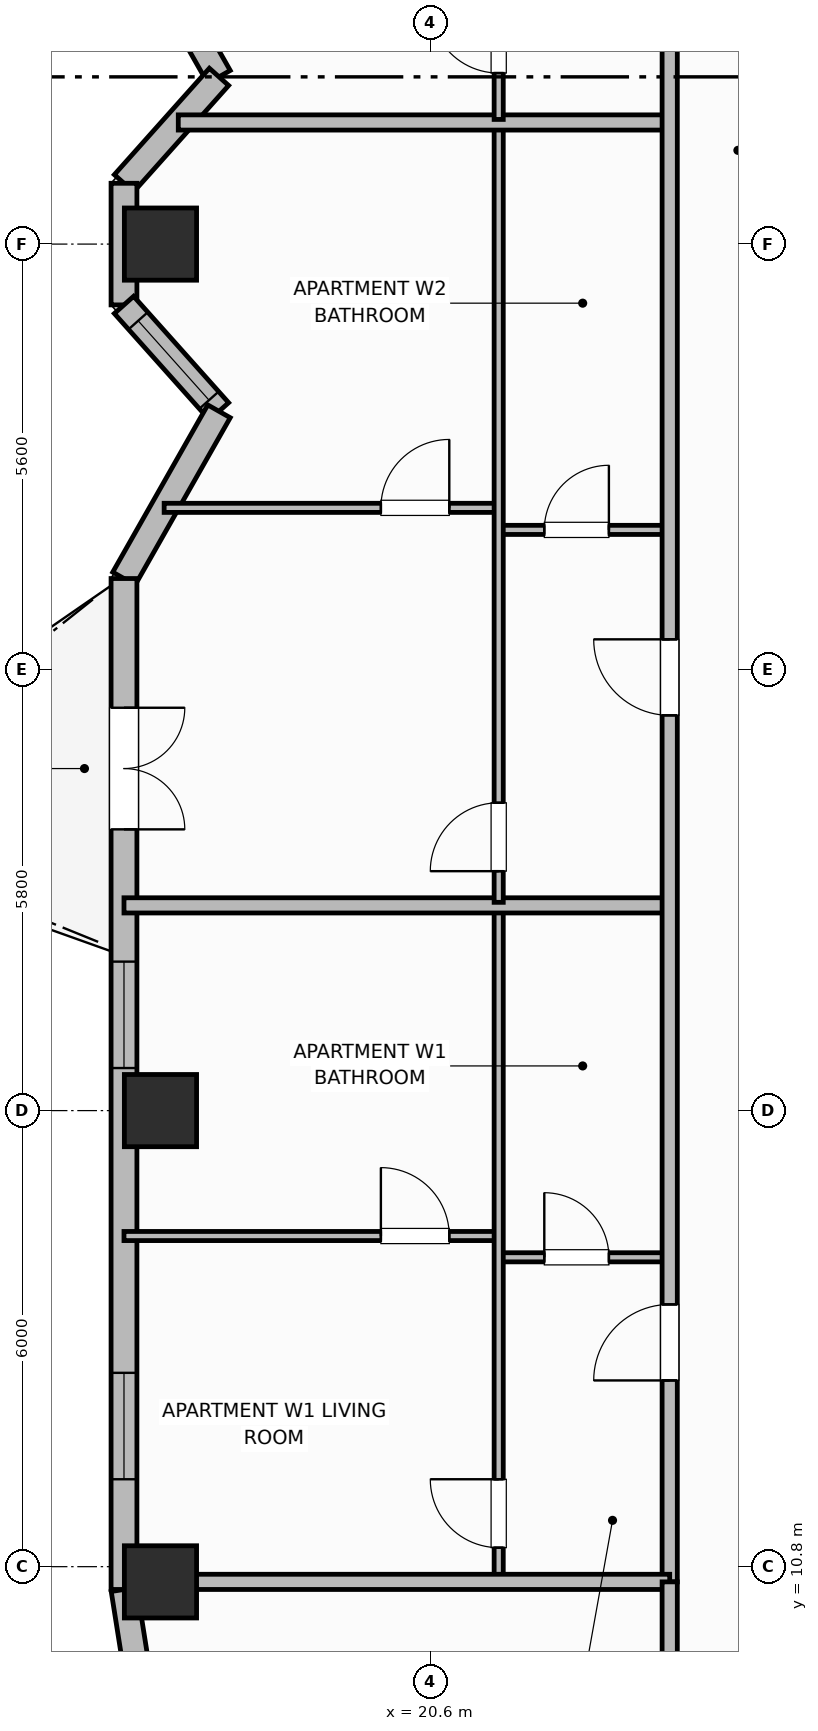
"""IFC4 building model, lengths in metres.
Left out: names, types, materials, properties, quantities, classifications, styles, units other than length and angle.
Written with IfcOpenShell. Run it as: python <this file> out.ifc"""

import sys

from ifc_helpers import new_model, si_unit, direction, frame, frame_2d, origin, origin_2d, place, context, subcontext, project, spatial, rectangle, extrude, element, fill, save


model = new_model("IFC4")
c1 = context("Model", 3, precision=1e-05, world=origin(), true_north=direction((0.0, 1.0)))
c2 = subcontext(c1, "Body", "Model", "MODEL_VIEW")
j1 = project(units=[si_unit("LENGTHUNIT", "METRE"), si_unit("PLANEANGLEUNIT", "RADIAN")], contexts=[c1])
p1 = place(None, origin())
s1 = spatial("IfcSite", under=j1, at=p1, CompositionType="ELEMENT")
p2 = place(p1, origin())
s2 = spatial("IfcBuilding", under=s1, at=p2, CompositionType="ELEMENT")
p3 = place(p2, frame((0.0, 0.0, 170.0)))
s3 = spatial("IfcBuildingStorey", under=s2, at=p3, CompositionType="ELEMENT", Elevation=170.0)
for number, where, z_axis, x_axis in (
    (1, (17.05, 10.6, 0.0), (0.0, 0.0, 1.0), (1.0, 0.0, 0.0)),
    (2, (17.05, 16.8, 0.0), (0.0, 0.0, 1.0), (1.0, 0.0, 0.0)),
    (3, (17.05, 28.2, 0.0), (0.0, 0.0, 1.0), (1.0, 0.0, 0.0)),
):
    element("IfcColumn", number, at=place(p3, frame(where, z_axis=z_axis, x_axis=x_axis)), inside=s3, PredefinedType="COLUMN", context=c2, shape_type="SweptSolid", body=[
        extrude(rectangle(XDim=0.95, YDim=0.95, at=origin_2d()), origin(), (0.0, 0.0, 1.0), 3.7),
    ])
p4 = place(p3, frame((16.57, 10.5, 0.0), z_axis=(0.0, 0.0, 1.0), x_axis=(0.156514556949, -0.987675651954, 0.0)))
e4 = element("IfcWall", 4, at=p4, inside=s3, PredefinedType="SOLIDWALL", context=c2, shape_type="SweptSolid", body=[
    extrude(rectangle(XDim=1.135, YDim=0.34, at=frame_2d((0.568, 0.0))), origin(), (0.0, 0.0, 1.0), 2.72),
])
p5 = place(p3, frame((16.57, 32.6, 0.0), z_axis=(0.0, 0.0, 1.0), x_axis=(0.493976255291, -0.869475393101, 0.0)))
e5 = element("IfcWall", 5, at=p5, inside=s3, PredefinedType="SOLIDWALL", context=c2, shape_type="SweptSolid", body=[
    extrude(rectangle(XDim=2.531, YDim=0.34, at=frame_2d((1.265, 0.0))), origin(), (0.0, 0.0, 1.0), 2.72),
])
p6 = place(p5, frame((0.715, 0.0, 0.91)))
e6 = element("IfcOpeningElement", 6, at=p6, cuts=e5, PredefinedType="OPENING", context=c2, shape_type="SweptSolid", body=[
    extrude(rectangle(XDim=1.1, YDim=1.65, at=frame_2d((0.55, 0.825))), frame((0.0, 0.18, 0.0), z_axis=(0.0, -1.0, 0.0), x_axis=(1.0, 0.0, 0.0)), (0.0, 0.0, 1.0), 0.36),
])
p7 = place(p3, frame((17.82, 30.4, 0.0), z_axis=(0.0, 0.0, 1.0), x_axis=(-0.666041619974, -0.74591457987, 0.0)))
e7 = element("IfcWall", 7, at=p7, inside=s3, PredefinedType="SOLIDWALL", context=c2, shape_type="SweptSolid", body=[
    extrude(rectangle(XDim=1.877, YDim=0.34, at=frame_2d((0.938, 0.0))), origin(), (0.0, 0.0, 1.0), 2.72),
])
p8 = place(p3, frame((16.57, 29.0, 0.0), z_axis=(0.0, 0.0, 1.0), x_axis=(0.0, -1.0, 0.0)))
e8 = element("IfcWall", 8, at=p8, inside=s3, PredefinedType="SOLIDWALL", context=c2, shape_type="SweptSolid", body=[
    extrude(rectangle(XDim=1.6, YDim=0.34, at=frame_2d((0.8, 0.0))), origin(), (0.0, 0.0, 1.0), 2.72),
])
p9 = place(p3, frame((16.57, 27.4, 0.0), z_axis=(0.0, 0.0, 1.0), x_axis=(0.666041619974, -0.74591457987, 0.0)))
e9 = element("IfcWall", 9, at=p9, inside=s3, PredefinedType="SOLIDWALL", context=c2, shape_type="SweptSolid", body=[
    extrude(rectangle(XDim=1.877, YDim=0.34, at=frame_2d((0.938, 0.0))), origin(), (0.0, 0.0, 1.0), 2.72),
])
p10 = place(p9, frame((0.28, 0.0, 0.71)))
e10 = element("IfcOpeningElement", 10, at=p10, cuts=e9, PredefinedType="OPENING", context=c2, shape_type="SweptSolid", body=[
    extrude(rectangle(XDim=1.4, YDim=1.85, at=frame_2d((0.7, 0.925))), frame((0.0, 0.18, 0.0), z_axis=(0.0, -1.0, 0.0), x_axis=(1.0, 0.0, 0.0)), (0.0, 0.0, 1.0), 0.36),
])
p11 = place(p3, frame((17.82, 26.0, 0.0), z_axis=(0.0, 0.0, 1.0), x_axis=(-0.494017696272, -0.869451847873, 0.0)))
e11 = element("IfcWall", 11, at=p11, inside=s3, PredefinedType="SOLIDWALL", context=c2, shape_type="SweptSolid", body=[
    extrude(rectangle(XDim=2.53, YDim=0.34, at=frame_2d((1.265, 0.0))), origin(), (0.0, 0.0, 1.0), 2.72),
])
p12 = place(p3, frame((16.57, 23.8, 0.0), z_axis=(0.0, 0.0, 1.0), x_axis=(0.0, -1.0, 0.0)))
e12 = element("IfcWall", 12, at=p12, inside=s3, PredefinedType="SOLIDWALL", context=c2, shape_type="SweptSolid", body=[
    extrude(rectangle(XDim=13.3, YDim=0.34, at=frame_2d((6.65, 0.0))), origin(), (0.0, 0.0, 1.0), 2.72),
])
p13 = place(p12, frame((1.7, 0.0, 0.0)))
e13 = element("IfcOpeningElement", 13, at=p13, cuts=e12, PredefinedType="OPENING", context=c2, shape_type="SweptSolid", body=[
    extrude(rectangle(XDim=1.6, YDim=2.1, at=frame_2d((0.8, 1.05))), frame((0.0, 0.18, 0.0), z_axis=(0.0, -1.0, 0.0), x_axis=(1.0, 0.0, 0.0)), (0.0, 0.0, 1.0), 0.36),
])
p14 = place(p12, frame((5.04, 0.0, 0.71)))
e14 = element("IfcOpeningElement", 14, at=p14, cuts=e12, PredefinedType="OPENING", context=c2, shape_type="SweptSolid", body=[
    extrude(rectangle(XDim=1.4, YDim=1.85, at=frame_2d((0.7, 0.925))), frame((0.0, 0.18, 0.0), z_axis=(0.0, -1.0, 0.0), x_axis=(1.0, 0.0, 0.0)), (0.0, 0.0, 1.0), 0.36),
])
p15 = place(p12, frame((10.45, 0.0, 0.75)))
e15 = element("IfcOpeningElement", 15, at=p15, cuts=e12, PredefinedType="OPENING", context=c2, shape_type="SweptSolid", body=[
    extrude(rectangle(XDim=1.4, YDim=1.85, at=frame_2d((0.7, 0.925))), frame((0.0, 0.18, 0.0), z_axis=(0.0, -1.0, 0.0), x_axis=(1.0, 0.0, 0.0)), (0.0, 0.0, 1.0), 0.36),
])
p16 = place(p3, frame((21.5, 14.87, 0.0), z_axis=(0.0, 0.0, 1.0), x_axis=(1.0, 0.0, 0.0)))
e16 = element("IfcWall", 16, at=p16, inside=s3, PredefinedType="PARTITIONING", context=c2, shape_type="SweptSolid", body=[
    extrude(rectangle(XDim=2.25, YDim=0.12, at=frame_2d((1.125, 0.0))), origin(), (0.0, 0.0, 1.0), 2.55),
])
p17 = place(p16, frame((0.6, 0.0, 0.0)))
e17 = element("IfcOpeningElement", 17, at=p17, cuts=e16, PredefinedType="OPENING", context=c2, shape_type="SweptSolid", body=[
    extrude(rectangle(XDim=0.85, YDim=2.1, at=frame_2d((0.425, 1.05))), frame((0.0, 0.07, 0.0), z_axis=(0.0, -1.0, 0.0), x_axis=(1.0, 0.0, 0.0)), (0.0, 0.0, 1.0), 0.14),
])
p18 = place(p3, frame((16.57, 15.15, 0.0), z_axis=(0.0, 0.0, 1.0), x_axis=(1.0, 0.0, 0.0)))
e18 = element("IfcWall", 18, at=p18, inside=s3, PredefinedType="PARTITIONING", context=c2, shape_type="SweptSolid", body=[
    extrude(rectangle(XDim=4.93, YDim=0.12, at=frame_2d((2.465, 0.0))), origin(), (0.0, 0.0, 1.0), 2.55),
])
p19 = place(p18, frame((3.38, 0.0, 0.0)))
e19 = element("IfcOpeningElement", 19, at=p19, cuts=e18, PredefinedType="OPENING", context=c2, shape_type="SweptSolid", body=[
    extrude(rectangle(XDim=0.9, YDim=2.1, at=frame_2d((0.45, 1.05))), frame((0.0, 0.07, 0.0), z_axis=(0.0, -1.0, 0.0), x_axis=(1.0, 0.0, 0.0)), (0.0, 0.0, 1.0), 0.14),
])
p20 = place(p3, frame((21.5, 10.64, 0.0), z_axis=(0.0, 0.0, 1.0), x_axis=(0.0, 1.0, 0.0)))
e20 = element("IfcWall", 20, at=p20, inside=s3, PredefinedType="PARTITIONING", context=c2, shape_type="SweptSolid", body=[
    extrude(rectangle(XDim=8.82, YDim=0.12, at=frame_2d((4.41, 0.0))), origin(), (0.0, 0.0, 1.0), 2.55),
])
p21 = place(p20, frame((0.41, 0.0, 0.0)))
e21 = element("IfcOpeningElement", 21, at=p21, cuts=e20, PredefinedType="OPENING", context=c2, shape_type="SweptSolid", body=[
    extrude(rectangle(XDim=0.9, YDim=2.1, at=frame_2d((0.45, 1.05))), frame((0.0, 0.07, 0.0), z_axis=(0.0, -1.0, 0.0), x_axis=(1.0, 0.0, 0.0)), (0.0, 0.0, 1.0), 0.14),
])
p22 = place(p3, frame((16.57, 19.5, 0.0), z_axis=(0.0, 0.0, 1.0), x_axis=(1.0, 0.0, 0.0)))
e22 = element("IfcWall", 22, at=p22, inside=s3, PredefinedType="PARTITIONING", context=c2, shape_type="SweptSolid", body=[
    extrude(rectangle(XDim=7.18, YDim=0.2, at=frame_2d((3.59, 0.0))), origin(), (0.0, 0.0, 1.0), 2.55),
])
p23 = place(p3, frame((21.5, 24.44, 0.0), z_axis=(0.0, 0.0, 1.0), x_axis=(1.0, 0.0, 0.0)))
e23 = element("IfcWall", 23, at=p23, inside=s3, PredefinedType="PARTITIONING", context=c2, shape_type="SweptSolid", body=[
    extrude(rectangle(XDim=2.25, YDim=0.12, at=frame_2d((1.125, 0.0))), origin(), (0.0, 0.0, 1.0), 2.55),
])
p24 = place(p23, frame((0.6, 0.0, 0.0)))
e24 = element("IfcOpeningElement", 24, at=p24, cuts=e23, PredefinedType="OPENING", context=c2, shape_type="SweptSolid", body=[
    extrude(rectangle(XDim=0.85, YDim=2.1, at=frame_2d((0.425, 1.05))), frame((0.0, 0.07, 0.0), z_axis=(0.0, -1.0, 0.0), x_axis=(1.0, 0.0, 0.0)), (0.0, 0.0, 1.0), 0.14),
])
p25 = place(p3, frame((17.098, 24.73, 0.0), z_axis=(0.0, 0.0, 1.0), x_axis=(1.0, 0.0, 0.0)))
e25 = element("IfcWall", 25, at=p25, inside=s3, PredefinedType="PARTITIONING", context=c2, shape_type="SweptSolid", body=[
    extrude(rectangle(XDim=4.402, YDim=0.12, at=frame_2d((2.201, 0.0))), origin(), (0.0, 0.0, 1.0), 2.55),
])
p26 = place(p25, frame((2.852, 0.0, 0.0)))
e26 = element("IfcOpeningElement", 26, at=p26, cuts=e25, PredefinedType="OPENING", context=c2, shape_type="SweptSolid", body=[
    extrude(rectangle(XDim=0.9, YDim=2.1, at=frame_2d((0.45, 1.05))), frame((0.0, 0.07, 0.0), z_axis=(0.0, -1.0, 0.0), x_axis=(1.0, 0.0, 0.0)), (0.0, 0.0, 1.0), 0.14),
])
p27 = place(p3, frame((21.5, 19.54, 0.0), z_axis=(0.0, 0.0, 1.0), x_axis=(0.0, 1.0, 0.0)))
e27 = element("IfcWall", 27, at=p27, inside=s3, PredefinedType="PARTITIONING", context=c2, shape_type="SweptSolid", body=[
    extrude(rectangle(XDim=10.22, YDim=0.12, at=frame_2d((5.11, 0.0))), origin(), (0.0, 0.0, 1.0), 2.55),
])
p28 = place(p27, frame((0.41, 0.0, 0.0)))
e28 = element("IfcOpeningElement", 28, at=p28, cuts=e27, PredefinedType="OPENING", context=c2, shape_type="SweptSolid", body=[
    extrude(rectangle(XDim=0.9, YDim=2.1, at=frame_2d((0.45, 1.05))), frame((0.0, 0.07, 0.0), z_axis=(0.0, -1.0, 0.0), x_axis=(1.0, 0.0, 0.0)), (0.0, 0.0, 1.0), 0.14),
])
p29 = place(p3, frame((17.284, 29.8, 0.0), z_axis=(0.0, 0.0, 1.0), x_axis=(1.0, 0.0, 0.0)))
e29 = element("IfcWall", 29, at=p29, inside=s3, PredefinedType="PARTITIONING", context=c2, shape_type="SweptSolid", body=[
    extrude(rectangle(XDim=6.466, YDim=0.2, at=frame_2d((3.233, 0.0))), origin(), (0.0, 0.0, 1.0), 2.55),
])
p30 = place(p3, frame((21.5, 29.84, 0.0), z_axis=(0.0, 0.0, 1.0), x_axis=(0.0, 1.0, 0.0)))
e30 = element("IfcWall", 30, at=p30, inside=s3, PredefinedType="PARTITIONING", context=c2, shape_type="SweptSolid", body=[
    extrude(rectangle(XDim=7.472, YDim=0.12, at=frame_2d((3.736, 0.0))), origin(), (0.0, 0.0, 1.0), 2.55),
])
p31 = place(p30, frame((0.61, 0.0, 0.0)))
e31 = element("IfcOpeningElement", 31, at=p31, cuts=e30, PredefinedType="OPENING", context=c2, shape_type="SweptSolid", body=[
    extrude(rectangle(XDim=0.9, YDim=2.1, at=frame_2d((0.45, 1.05))), frame((0.0, 0.07, 0.0), z_axis=(0.0, -1.0, 0.0), x_axis=(1.0, 0.0, 0.0)), (0.0, 0.0, 1.0), 0.14),
])
p32 = place(p3, frame((23.75, 10.6, 0.0), z_axis=(0.0, 0.0, 1.0), x_axis=(0.0, 1.0, 0.0)))
e32 = element("IfcWall", 32, at=p32, inside=s3, PredefinedType="PARTITIONING", context=c2, shape_type="SweptSolid", body=[
    extrude(rectangle(XDim=35.2, YDim=0.2, at=frame_2d((17.6, 0.0))), origin(), (0.0, 0.0, 1.0), 2.55),
])
p33 = place(p32, frame((2.65, 0.0, 0.0)))
e33 = element("IfcOpeningElement", 33, at=p33, cuts=e32, PredefinedType="OPENING", context=c2, shape_type="SweptSolid", body=[
    extrude(rectangle(XDim=1.0, YDim=2.15, at=frame_2d((0.5, 1.075))), frame((0.0, 0.11, 0.0), z_axis=(0.0, -1.0, 0.0), x_axis=(1.0, 0.0, 0.0)), (0.0, 0.0, 1.0), 0.22),
])
p34 = place(p32, frame((11.4, 0.0, 0.0)))
e34 = element("IfcOpeningElement", 34, at=p34, cuts=e32, PredefinedType="OPENING", context=c2, shape_type="SweptSolid", body=[
    extrude(rectangle(XDim=1.0, YDim=2.15, at=frame_2d((0.5, 1.075))), frame((0.0, 0.11, 0.0), z_axis=(0.0, -1.0, 0.0), x_axis=(1.0, 0.0, 0.0)), (0.0, 0.0, 1.0), 0.22),
])
p35 = place(p32, frame((21.37, 0.0, 0.0)))
e35 = element("IfcOpeningElement", 35, at=p35, cuts=e32, PredefinedType="OPENING", context=c2, shape_type="SweptSolid", body=[
    extrude(rectangle(XDim=1.0, YDim=2.15, at=frame_2d((0.5, 1.075))), frame((0.0, 0.11, 0.0), z_axis=(0.0, -1.0, 0.0), x_axis=(1.0, 0.0, 0.0)), (0.0, 0.0, 1.0), 0.22),
])
p36 = place(p32, frame((27.302, 0.0, 0.0)))
e36 = element("IfcOpeningElement", 36, at=p36, cuts=e32, PredefinedType="OPENING", context=c2, shape_type="SweptSolid", body=[
    extrude(rectangle(XDim=1.0, YDim=2.15, at=frame_2d((0.5, 1.075))), frame((0.0, 0.11, 0.0), z_axis=(0.0, -1.0, 0.0), x_axis=(1.0, 0.0, 0.0)), (0.0, 0.0, 1.0), 0.22),
])
p37 = place(p3, frame((16.99, 10.6, 0.0), z_axis=(0.0, 0.0, 1.0), x_axis=(1.0, 0.0, 0.0)))
e37 = element("IfcWall", 37, at=p37, inside=s3, PredefinedType="PARTITIONING", context=c2, shape_type="SweptSolid", body=[
    extrude(rectangle(XDim=6.76, YDim=0.2, at=frame_2d((3.38, 0.0))), origin(), (0.0, 0.0, 1.0), 2.55),
])
p38 = place(p3, frame((23.75, 6.87, 0.0), z_axis=(0.0, 0.0, 1.0), x_axis=(0.0, 1.0, 0.0)))
e38 = element("IfcWall", 38, at=p38, inside=s3, PredefinedType="PARTITIONING", context=c2, shape_type="SweptSolid", body=[
    extrude(rectangle(XDim=3.73, YDim=0.2, at=frame_2d((1.865, 0.0))), origin(), (0.0, 0.0, 1.0), 2.55),
])
p39 = place(p10, origin())
e39 = element("IfcWindow", 39, at=p39, inside=s3, PartitioningType="SINGLE_PANEL", PredefinedType="WINDOW", context=c2, shape_type="SweptSolid", body=[
    extrude(rectangle(XDim=1.4, YDim=1.85, at=frame_2d((0.7, 0.925))), frame((0.0, 0.03, 0.0), z_axis=(0.0, -1.0, 0.0), x_axis=(1.0, 0.0, 0.0)), (0.0, 0.0, 1.0), 0.06),
])
fill(e10, e39)
p40 = place(p13, origin())
e40 = element("IfcDoor", 40, at=p40, inside=s3, OperationType="DOUBLE_DOOR_SINGLE_SWING", PredefinedType="DOOR", context=c2, shape_type="SweptSolid", body=[
    extrude(rectangle(XDim=1.6, YDim=2.1, at=frame_2d((0.8, 1.05))), frame((0.0, 0.025, 0.0), z_axis=(0.0, -1.0, 0.0), x_axis=(1.0, 0.0, 0.0)), (0.0, 0.0, 1.0), 0.05),
])
fill(e13, e40)
p41 = place(p14, origin())
e41 = element("IfcWindow", 41, at=p41, inside=s3, PartitioningType="SINGLE_PANEL", PredefinedType="WINDOW", context=c2, shape_type="SweptSolid", body=[
    extrude(rectangle(XDim=1.4, YDim=1.85, at=frame_2d((0.7, 0.925))), frame((0.0, 0.03, 0.0), z_axis=(0.0, -1.0, 0.0), x_axis=(1.0, 0.0, 0.0)), (0.0, 0.0, 1.0), 0.06),
])
fill(e14, e41)
p42 = place(p15, origin())
e42 = element("IfcWindow", 42, at=p42, inside=s3, PartitioningType="SINGLE_PANEL", PredefinedType="WINDOW", context=c2, shape_type="SweptSolid", body=[
    extrude(rectangle(XDim=1.4, YDim=1.85, at=frame_2d((0.7, 0.925))), frame((0.0, 0.03, 0.0), z_axis=(0.0, -1.0, 0.0), x_axis=(1.0, 0.0, 0.0)), (0.0, 0.0, 1.0), 0.06),
])
fill(e15, e42)
p43 = place(p17, origin())
e43 = element("IfcDoor", 43, at=p43, inside=s3, OperationType="SINGLE_SWING_LEFT", PredefinedType="DOOR", context=c2, shape_type="SweptSolid", body=[
    extrude(rectangle(XDim=0.85, YDim=2.1, at=frame_2d((0.425, 1.05))), frame((0.0, 0.025, 0.0), z_axis=(0.0, -1.0, 0.0), x_axis=(1.0, 0.0, 0.0)), (0.0, 0.0, 1.0), 0.05),
])
fill(e17, e43)
p44 = place(p19, origin())
e44 = element("IfcDoor", 44, at=p44, inside=s3, OperationType="SINGLE_SWING_LEFT", PredefinedType="DOOR", context=c2, shape_type="SweptSolid", body=[
    extrude(rectangle(XDim=0.9, YDim=2.1, at=frame_2d((0.45, 1.05))), frame((0.0, 0.025, 0.0), z_axis=(0.0, -1.0, 0.0), x_axis=(1.0, 0.0, 0.0)), (0.0, 0.0, 1.0), 0.05),
])
fill(e19, e44)
p45 = place(p21, origin())
e45 = element("IfcDoor", 45, at=p45, inside=s3, OperationType="SINGLE_SWING_RIGHT", PredefinedType="DOOR", context=c2, shape_type="SweptSolid", body=[
    extrude(rectangle(XDim=0.9, YDim=2.1, at=frame_2d((0.45, 1.05))), frame((0.0, 0.025, 0.0), z_axis=(0.0, -1.0, 0.0), x_axis=(1.0, 0.0, 0.0)), (0.0, 0.0, 1.0), 0.05),
])
fill(e21, e45)
p46 = place(p24, origin())
e46 = element("IfcDoor", 46, at=p46, inside=s3, OperationType="SINGLE_SWING_RIGHT", PredefinedType="DOOR", context=c2, shape_type="SweptSolid", body=[
    extrude(rectangle(XDim=0.85, YDim=2.1, at=frame_2d((0.425, 1.05))), frame((0.0, 0.025, 0.0), z_axis=(0.0, -1.0, 0.0), x_axis=(1.0, 0.0, 0.0)), (0.0, 0.0, 1.0), 0.05),
])
fill(e24, e46)
p47 = place(p26, origin())
e47 = element("IfcDoor", 47, at=p47, inside=s3, OperationType="SINGLE_SWING_RIGHT", PredefinedType="DOOR", context=c2, shape_type="SweptSolid", body=[
    extrude(rectangle(XDim=0.9, YDim=2.1, at=frame_2d((0.45, 1.05))), frame((0.0, 0.025, 0.0), z_axis=(0.0, -1.0, 0.0), x_axis=(1.0, 0.0, 0.0)), (0.0, 0.0, 1.0), 0.05),
])
fill(e26, e47)
p48 = place(p28, origin())
e48 = element("IfcDoor", 48, at=p48, inside=s3, OperationType="SINGLE_SWING_LEFT", PredefinedType="DOOR", context=c2, shape_type="SweptSolid", body=[
    extrude(rectangle(XDim=0.9, YDim=2.1, at=frame_2d((0.45, 1.05))), frame((0.0, 0.025, 0.0), z_axis=(0.0, -1.0, 0.0), x_axis=(1.0, 0.0, 0.0)), (0.0, 0.0, 1.0), 0.05),
])
fill(e28, e48)
p49 = place(p31, origin())
e49 = element("IfcDoor", 49, at=p49, inside=s3, OperationType="SINGLE_SWING_RIGHT", PredefinedType="DOOR", context=c2, shape_type="SweptSolid", body=[
    extrude(rectangle(XDim=0.9, YDim=2.1, at=frame_2d((0.45, 1.05))), frame((0.0, 0.025, 0.0), z_axis=(0.0, -1.0, 0.0), x_axis=(1.0, 0.0, 0.0)), (0.0, 0.0, 1.0), 0.05),
])
fill(e31, e49)
p50 = place(p33, origin())
e50 = element("IfcDoor", 50, at=p50, inside=s3, OperationType="SINGLE_SWING_LEFT", PredefinedType="DOOR", context=c2, shape_type="SweptSolid", body=[
    extrude(rectangle(XDim=1.0, YDim=2.15, at=frame_2d((0.5, 1.075))), frame((0.0, 0.025, 0.0), z_axis=(0.0, -1.0, 0.0), x_axis=(1.0, 0.0, 0.0)), (0.0, 0.0, 1.0), 0.05),
])
fill(e33, e50)
p51 = place(p34, origin())
e51 = element("IfcDoor", 51, at=p51, inside=s3, OperationType="SINGLE_SWING_RIGHT", PredefinedType="DOOR", context=c2, shape_type="SweptSolid", body=[
    extrude(rectangle(XDim=1.0, YDim=2.15, at=frame_2d((0.5, 1.075))), frame((0.0, 0.025, 0.0), z_axis=(0.0, -1.0, 0.0), x_axis=(1.0, 0.0, 0.0)), (0.0, 0.0, 1.0), 0.05),
])
fill(e34, e51)
save(model, sys.argv[1])
